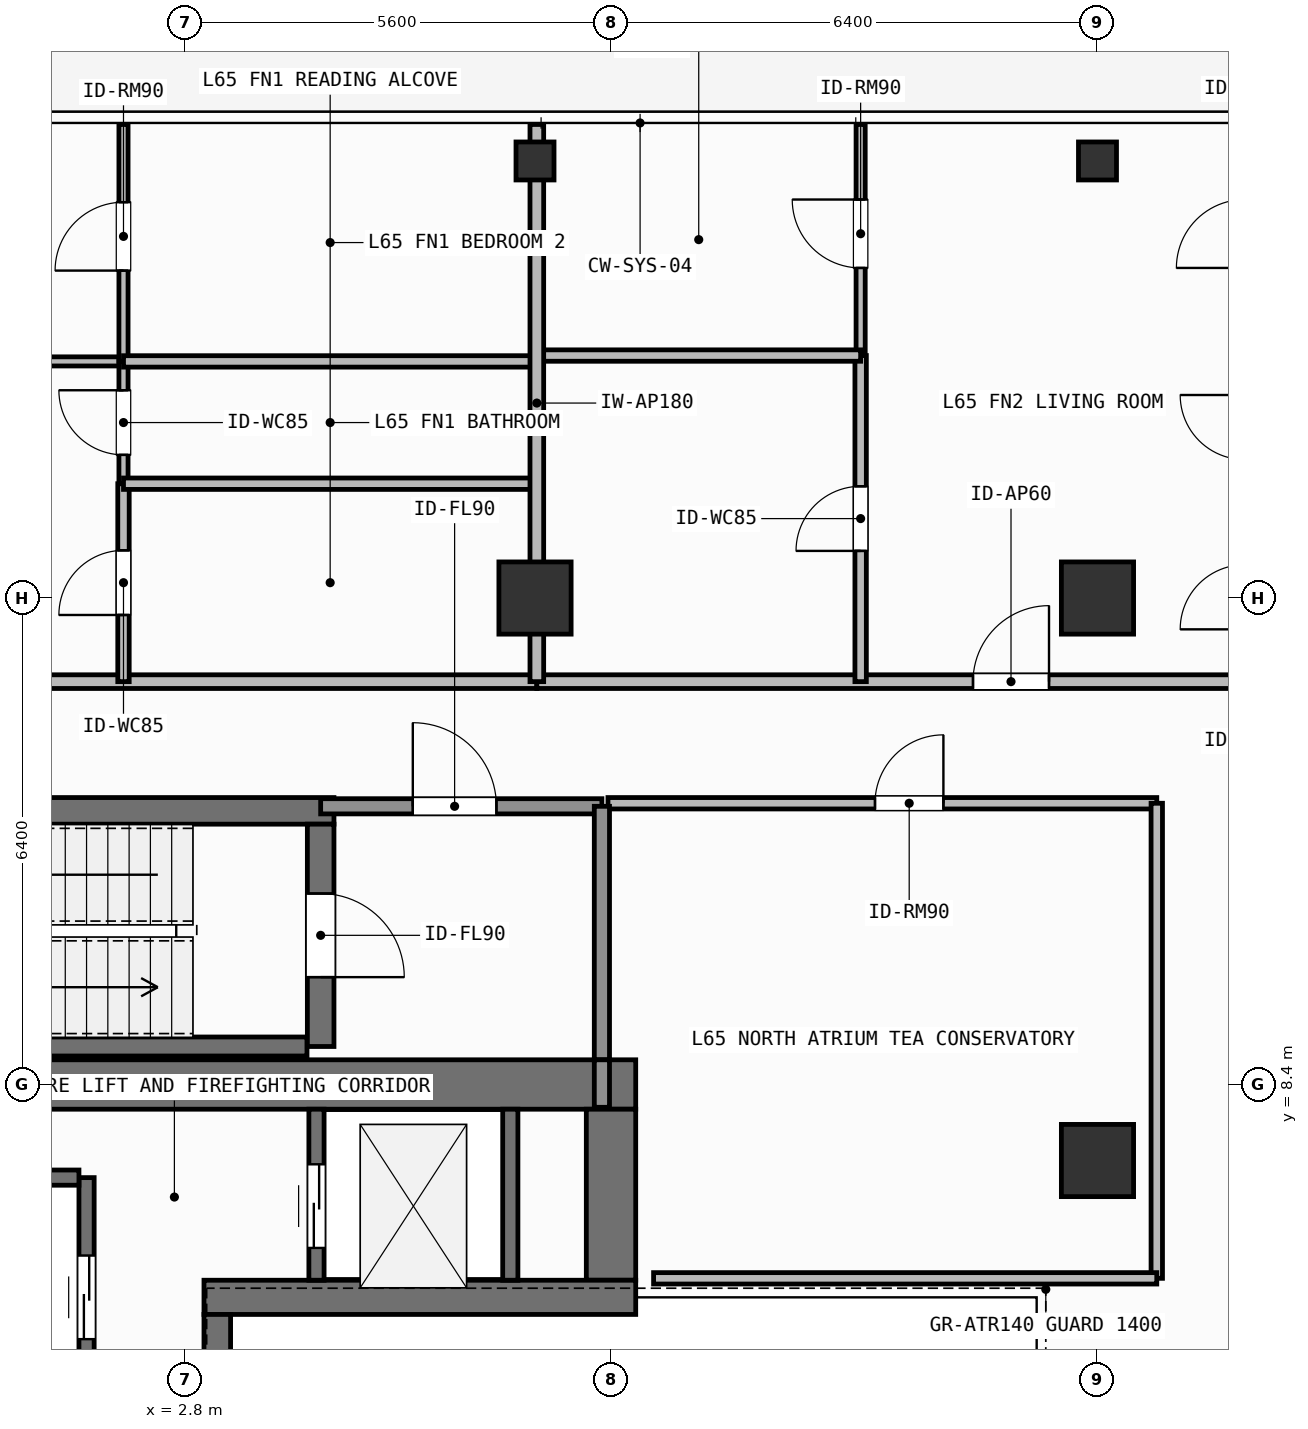
"""IFC4 building model, lengths in metres.
Left out: names, types, materials, properties, quantities, classifications, styles, units other than length and angle.
Written with IfcOpenShell. Run it as: python <this file> out.ifc"""

import sys

from ifc_helpers import new_model, si_unit, direction, frame, frame_2d, origin, origin_2d, place, context, subcontext, project, spatial, rectangle, hollow_rectangle, extrude, element, fill, save


model = new_model("IFC4")
c1 = context("Model", 3, precision=1e-05, world=origin(), true_north=direction((0.0, 1.0)))
c2 = subcontext(c1, "Body", "Model", "MODEL_VIEW")
j1 = project(units=[si_unit("LENGTHUNIT", "METRE"), si_unit("PLANEANGLEUNIT", "RADIAN")], contexts=[c1])
p1 = place(None, origin())
s1 = spatial("IfcSite", under=j1, at=p1, CompositionType="ELEMENT")
p2 = place(p1, origin())
s2 = spatial("IfcBuilding", under=s1, at=p2, CompositionType="ELEMENT")
p3 = place(p2, frame((0.0, 0.0, 266.4)))
s3 = spatial("IfcBuildingStorey", under=s2, at=p3, CompositionType="ELEMENT", Elevation=266.4)
p4 = place(p3, frame((-7.55, 8.4, 0.0), z_axis=(0.0, 0.0, 1.0), x_axis=(1.0, 0.0, 0.0)))
e1 = element("IfcWall", 1, at=p4, inside=s3, PredefinedType="SHEAR", context=c2, shape_type="SweptSolid", body=[
    extrude(rectangle(XDim=16.275, YDim=0.65, at=frame_2d((8.138, 0.0))), origin(), (0.0, 0.0, 1.0), 3.9),
])
p5 = place(p3, frame((8.4, 5.825, 0.0), z_axis=(0.0, 0.0, 1.0), x_axis=(0.0, 1.0, 0.0)))
e2 = element("IfcWall", 2, at=p5, inside=s3, PredefinedType="SHEAR", context=c2, shape_type="SweptSolid", body=[
    extrude(rectangle(XDim=2.25, YDim=0.65, at=frame_2d((1.125, 0.0))), origin(), (0.0, 0.0, 1.0), 3.9),
])
p6 = place(p3, frame((3.045, 5.6, 0.0), z_axis=(0.0, 0.0, 1.0), x_axis=(1.0, 0.0, 0.0)))
e3 = element("IfcWall", 3, at=p6, inside=s3, PredefinedType="SHEAR", context=c2, shape_type="SweptSolid", body=[
    extrude(rectangle(XDim=5.68, YDim=0.45, at=frame_2d((2.84, 0.0))), origin(), (0.0, 0.0, 1.0), 3.9),
])
p7 = place(p3, frame((3.22, -5.375, 0.0), z_axis=(0.0, 0.0, 1.0), x_axis=(0.0, 1.0, 0.0)))
e4 = element("IfcWall", 4, at=p7, inside=s3, PredefinedType="SHEAR", context=c2, shape_type="SweptSolid", body=[
    extrude(rectangle(XDim=10.75, YDim=0.35, at=frame_2d((5.375, 0.0))), origin(), (0.0, 0.0, 1.0), 3.9),
])
p8 = place(p3, frame((-2.555, 12.0, 0.0), z_axis=(0.0, 0.0, 1.0), x_axis=(1.0, 0.0, 0.0)))
e5 = element("IfcWall", 5, at=p8, inside=s3, PredefinedType="SHEAR", context=c2, shape_type="SweptSolid", body=[
    extrude(rectangle(XDim=7.31, YDim=0.35, at=frame_2d((3.655, 0.0))), origin(), (0.0, 0.0, 1.0), 3.9),
])
p9 = place(p3, frame((-2.2, 8.9, 0.0), z_axis=(0.0, 0.0, 1.0), x_axis=(1.0, 0.0, 0.0)))
e6 = element("IfcWall", 6, at=p9, inside=s3, PredefinedType="SHEAR", context=c2, shape_type="SweptSolid", body=[
    extrude(rectangle(XDim=6.6, YDim=0.25, at=frame_2d((3.3, 0.0))), origin(), (0.0, 0.0, 1.0), 3.9),
])
p10 = place(p3, frame((4.58, 11.825, 0.0), z_axis=(0.0, 0.0, 1.0), x_axis=(0.0, -1.0, 0.0)))
e7 = element("IfcWall", 7, at=p10, inside=s3, PredefinedType="SHEAR", context=c2, shape_type="SweptSolid", body=[
    extrude(rectangle(XDim=2.925, YDim=0.35, at=frame_2d((1.462, 0.0))), origin(), (0.0, 0.0, 1.0), 3.9),
])
p11 = place(p10, frame((0.913, 0.0, 0.0)))
e8 = element("IfcOpeningElement", 8, at=p11, cuts=e7, PredefinedType="OPENING", context=c2, shape_type="SweptSolid", body=[
    extrude(rectangle(XDim=1.1, YDim=2.15, at=frame_2d((0.55, 1.075))), frame((0.0, 0.185, 0.0), z_axis=(0.0, -1.0, 0.0), x_axis=(1.0, 0.0, 0.0)), (0.0, 0.0, 1.0), 0.37),
])
for number, where, z_axis, x_axis in (
    (9, (7.4, 14.8, 0.0), (0.0, 0.0, 1.0), (1.0, 0.0, 0.0)),
    (10, (14.8, 14.8, 0.0), (0.0, 0.0, 1.0), (1.0, 0.0, 0.0)),
    (11, (14.8, 7.4, 0.0), (0.0, 0.0, 1.0), (1.0, 0.0, 0.0)),
):
    element("IfcColumn", number, at=place(p3, frame(where, z_axis=z_axis, x_axis=x_axis)), inside=s3, PredefinedType="COLUMN", context=c2, shape_type="SweptSolid", body=[
        extrude(rectangle(XDim=0.95, YDim=0.95, at=origin_2d()), origin(), (0.0, 0.0, 1.0), 3.9),
    ])
for number, where, z_axis, x_axis in (
    (12, (7.4, 20.55, 0.0), (0.0, 0.0, 1.0), (1.0, 0.0, 0.0)),
    (13, (14.8, 20.55, 0.0), (0.0, 0.0, 1.0), (1.0, 0.0, 0.0)),
):
    element("IfcColumn", number, at=place(p3, frame(where, z_axis=z_axis, x_axis=x_axis)), inside=s3, PredefinedType="COLUMN", context=c2, shape_type="SweptSolid", body=[
        extrude(hollow_rectangle(XDim=0.5, YDim=0.5, WallThickness=0.025, at=origin_2d()), origin(), (0.0, 0.0, 1.0), 3.9),
    ])
p12 = place(p3, frame((1.5, 4.025, 0.0), z_axis=(0.0, 0.0, 1.0), x_axis=(0.0, 1.0, 0.0)))
e14 = element("IfcWall", 14, at=p12, inside=s3, PredefinedType="SHEAR", context=c2, shape_type="SweptSolid", body=[
    extrude(rectangle(XDim=3.15, YDim=0.2, at=frame_2d((1.575, 0.0))), origin(), (0.0, 0.0, 1.0), 3.68),
])
p13 = place(p12, frame((1.025, 0.0, 0.0)))
e15 = element("IfcOpeningElement", 15, at=p13, cuts=e14, PredefinedType="OPENING", context=c2, shape_type="SweptSolid", body=[
    extrude(rectangle(XDim=1.1, YDim=2.2, at=frame_2d((0.55, 1.1))), frame((0.0, 0.11, 0.0), z_axis=(0.0, -1.0, 0.0), x_axis=(1.0, 0.0, 0.0)), (0.0, 0.0, 1.0), 0.22),
])
p14 = place(p3, frame((-1.0, 7.175, 0.0), z_axis=(0.0, 0.0, 1.0), x_axis=(1.0, 0.0, 0.0)))
e16 = element("IfcWall", 16, at=p14, inside=s3, PredefinedType="SHEAR", context=c2, shape_type="SweptSolid", body=[
    extrude(rectangle(XDim=2.4, YDim=0.2, at=frame_2d((1.2, 0.0))), origin(), (0.0, 0.0, 1.0), 3.68),
])
p15 = place(p3, frame((4.525, 5.825, 0.0), z_axis=(0.0, 0.0, 1.0), x_axis=(0.0, 1.0, 0.0)))
e17 = element("IfcWall", 17, at=p15, inside=s3, PredefinedType="SHEAR", context=c2, shape_type="SweptSolid", body=[
    extrude(rectangle(XDim=2.25, YDim=0.2, at=frame_2d((1.125, 0.0))), origin(), (0.0, 0.0, 1.0), 3.68),
])
p16 = place(p15, frame((0.425, 0.0, 0.0)))
e18 = element("IfcOpeningElement", 18, at=p16, cuts=e17, PredefinedType="OPENING", context=c2, shape_type="SweptSolid", body=[
    extrude(rectangle(XDim=1.1, YDim=2.2, at=frame_2d((0.55, 1.1))), frame((0.0, 0.11, 0.0), z_axis=(0.0, -1.0, 0.0), x_axis=(1.0, 0.0, 0.0)), (0.0, 0.0, 1.0), 0.22),
])
p17 = place(p3, frame((7.075, 5.825, 0.0), z_axis=(0.0, 0.0, 1.0), x_axis=(0.0, 1.0, 0.0)))
e19 = element("IfcWall", 19, at=p17, inside=s3, PredefinedType="SHEAR", context=c2, shape_type="SweptSolid", body=[
    extrude(rectangle(XDim=2.25, YDim=0.2, at=frame_2d((1.125, 0.0))), origin(), (0.0, 0.0, 1.0), 3.68),
])
p18 = place(p3, frame((4.58, 12.06, 0.0), z_axis=(0.0, 0.0, 1.0), x_axis=(1.0, 0.0, 0.0)))
e20 = element("IfcWall", 20, at=p18, inside=s3, PredefinedType="SOLIDWALL", context=c2, shape_type="SweptSolid", body=[
    extrude(rectangle(XDim=3.7, YDim=0.2, at=frame_2d((1.85, 0.0))), origin(), (0.0, 0.0, 1.0), 3.68),
])
p19 = place(p18, frame((1.212, 0.0, 0.0)))
e21 = element("IfcOpeningElement", 21, at=p19, cuts=e20, PredefinedType="OPENING", context=c2, shape_type="SweptSolid", body=[
    extrude(rectangle(XDim=1.1, YDim=2.15, at=frame_2d((0.55, 1.075))), frame((0.0, 0.11, 0.0), z_axis=(0.0, -1.0, 0.0), x_axis=(1.0, 0.0, 0.0)), (0.0, 0.0, 1.0), 0.22),
])
p20 = place(p3, frame((8.36, 12.1, 0.0), z_axis=(0.0, 0.0, 1.0), x_axis=(1.0, 0.0, 0.0)))
e22 = element("IfcWall", 22, at=p20, inside=s3, PredefinedType="PARTITIONING", context=c2, shape_type="SweptSolid", body=[
    extrude(rectangle(XDim=7.22, YDim=0.15, at=frame_2d((3.61, 0.0))), origin(), (0.0, 0.0, 1.0), 3.68),
])
p21 = place(p20, frame((3.513, 0.0, 0.0)))
e23 = element("IfcOpeningElement", 23, at=p21, cuts=e22, PredefinedType="OPENING", context=c2, shape_type="SweptSolid", body=[
    extrude(rectangle(XDim=0.9, YDim=2.1, at=frame_2d((0.45, 1.05))), frame((0.0, 0.085, 0.0), z_axis=(0.0, -1.0, 0.0), x_axis=(1.0, 0.0, 0.0)), (0.0, 0.0, 1.0), 0.17),
])
p22 = place(p3, frame((-13.72, 13.7, 0.0), z_axis=(0.0, 0.0, 1.0), x_axis=(1.0, 0.0, 0.0)))
e24 = element("IfcWall", 24, at=p22, inside=s3, PredefinedType="PARTITIONING", context=c2, shape_type="SweptSolid", body=[
    extrude(rectangle(XDim=21.144, YDim=0.18, at=frame_2d((10.572, 0.0))), origin(), (0.0, 0.0, 1.0), 3.68),
])
p23 = place(p22, frame((9.625, 0.0, 0.0)))
e25 = element("IfcOpeningElement", 25, at=p23, cuts=e24, PredefinedType="OPENING", context=c2, shape_type="SweptSolid", body=[
    extrude(rectangle(XDim=1.0, YDim=2.2, at=frame_2d((0.5, 1.1))), frame((0.0, 0.1, 0.0), z_axis=(0.0, -1.0, 0.0), x_axis=(1.0, 0.0, 0.0)), (0.0, 0.0, 1.0), 0.2),
])
p24 = place(p3, frame((-9.395, 17.913, 0.0), z_axis=(0.0, 0.0, 1.0), x_axis=(1.0, 0.0, 0.0)))
e26 = element("IfcWall", 26, at=p24, inside=s3, PredefinedType="PARTITIONING", context=c2, shape_type="SweptSolid", body=[
    extrude(rectangle(XDim=11.381, YDim=0.12, at=frame_2d((5.69, 0.0))), origin(), (0.0, 0.0, 1.0), 3.68),
])
p25 = place(p24, frame((5.151, 0.0, 0.0)))
e27 = element("IfcOpeningElement", 27, at=p25, cuts=e26, PredefinedType="OPENING", context=c2, shape_type="SweptSolid", body=[
    extrude(rectangle(XDim=0.9, YDim=2.1, at=frame_2d((0.45, 1.05))), frame((0.0, 0.07, 0.0), z_axis=(0.0, -1.0, 0.0), x_axis=(1.0, 0.0, 0.0)), (0.0, 0.0, 1.0), 0.14),
])
p26 = place(p3, frame((1.986, 13.7, 0.0), z_axis=(0.0, 0.0, 1.0), x_axis=(0.0, 1.0, 0.0)))
e28 = element("IfcWall", 28, at=p26, inside=s3, PredefinedType="PARTITIONING", context=c2, shape_type="SweptSolid", body=[
    extrude(rectangle(XDim=2.604, YDim=0.15, at=frame_2d((1.302, 0.0))), origin(), (0.0, 0.0, 1.0), 3.68),
])
p27 = place(p26, frame((0.877, 0.0, 0.0)))
e29 = element("IfcOpeningElement", 29, at=p27, cuts=e28, PredefinedType="OPENING", context=c2, shape_type="SweptSolid", body=[
    extrude(rectangle(XDim=0.85, YDim=2.1, at=frame_2d((0.425, 1.05))), frame((0.0, 0.085, 0.0), z_axis=(0.0, -1.0, 0.0), x_axis=(1.0, 0.0, 0.0)), (0.0, 0.0, 1.0), 0.17),
])
p28 = place(p3, frame((1.986, 16.304, 0.0), z_axis=(0.0, 0.0, 1.0), x_axis=(0.0, 1.0, 0.0)))
e30 = element("IfcWall", 30, at=p28, inside=s3, PredefinedType="PARTITIONING", context=c2, shape_type="SweptSolid", body=[
    extrude(rectangle(XDim=1.609, YDim=0.12, at=frame_2d((0.805, 0.0))), origin(), (0.0, 0.0, 1.0), 3.68),
])
p29 = place(p28, frame((0.379, 0.0, 0.0)))
e31 = element("IfcOpeningElement", 31, at=p29, cuts=e30, PredefinedType="OPENING", context=c2, shape_type="SweptSolid", body=[
    extrude(rectangle(XDim=0.85, YDim=2.1, at=frame_2d((0.425, 1.05))), frame((0.0, 0.07, 0.0), z_axis=(0.0, -1.0, 0.0), x_axis=(1.0, 0.0, 0.0)), (0.0, 0.0, 1.0), 0.14),
])
p30 = place(p3, frame((1.986, 17.913, 0.0), z_axis=(0.0, 0.0, 1.0), x_axis=(0.0, 1.0, 0.0)))
e32 = element("IfcWall", 32, at=p30, inside=s3, PredefinedType="PARTITIONING", context=c2, shape_type="SweptSolid", body=[
    extrude(rectangle(XDim=3.117, YDim=0.12, at=frame_2d((1.559, 0.0))), origin(), (0.0, 0.0, 1.0), 3.68),
])
p31 = place(p30, frame((1.195, 0.0, 0.0)))
e33 = element("IfcOpeningElement", 33, at=p31, cuts=e32, PredefinedType="OPENING", context=c2, shape_type="SweptSolid", body=[
    extrude(rectangle(XDim=0.9, YDim=2.1, at=frame_2d((0.45, 1.05))), frame((0.0, 0.07, 0.0), z_axis=(0.0, -1.0, 0.0), x_axis=(1.0, 0.0, 0.0)), (0.0, 0.0, 1.0), 0.14),
])
p32 = place(p3, frame((7.424, 13.7, 0.0), z_axis=(0.0, 0.0, 1.0), x_axis=(1.0, 0.0, 0.0)))
e34 = element("IfcWall", 34, at=p32, inside=s3, PredefinedType="PARTITIONING", context=c2, shape_type="SweptSolid", body=[
    extrude(rectangle(XDim=14.096, YDim=0.18, at=frame_2d((7.048, 0.0))), origin(), (0.0, 0.0, 1.0), 3.68),
])
p33 = place(p32, frame((5.738, 0.0, 0.0)))
e35 = element("IfcOpeningElement", 35, at=p33, cuts=e34, PredefinedType="OPENING", context=c2, shape_type="SweptSolid", body=[
    extrude(rectangle(XDim=1.0, YDim=2.2, at=frame_2d((0.5, 1.1))), frame((0.0, 0.1, 0.0), z_axis=(0.0, -1.0, 0.0), x_axis=(1.0, 0.0, 0.0)), (0.0, 0.0, 1.0), 0.2),
])
p34 = place(p3, frame((11.684, 13.7, 0.0), z_axis=(0.0, 0.0, 1.0), x_axis=(0.0, 1.0, 0.0)))
e36 = element("IfcWall", 36, at=p34, inside=s3, PredefinedType="PARTITIONING", context=c2, shape_type="SweptSolid", body=[
    extrude(rectangle(XDim=4.29, YDim=0.15, at=frame_2d((2.145, 0.0))), origin(), (0.0, 0.0, 1.0), 3.68),
])
p35 = place(p34, frame((1.72, 0.0, 0.0)))
e37 = element("IfcOpeningElement", 37, at=p35, cuts=e36, PredefinedType="OPENING", context=c2, shape_type="SweptSolid", body=[
    extrude(rectangle(XDim=0.85, YDim=2.1, at=frame_2d((0.425, 1.05))), frame((0.0, 0.085, 0.0), z_axis=(0.0, -1.0, 0.0), x_axis=(1.0, 0.0, 0.0)), (0.0, 0.0, 1.0), 0.17),
])
p36 = place(p3, frame((11.684, 17.99, 0.0), z_axis=(0.0, 0.0, 1.0), x_axis=(0.0, 1.0, 0.0)))
e38 = element("IfcWall", 38, at=p36, inside=s3, PredefinedType="PARTITIONING", context=c2, shape_type="SweptSolid", body=[
    extrude(rectangle(XDim=3.04, YDim=0.12, at=frame_2d((1.52, 0.0))), origin(), (0.0, 0.0, 1.0), 3.68),
])
p37 = place(p36, frame((1.153, 0.0, 0.0)))
e39 = element("IfcOpeningElement", 39, at=p37, cuts=e38, PredefinedType="OPENING", context=c2, shape_type="SweptSolid", body=[
    extrude(rectangle(XDim=0.9, YDim=2.1, at=frame_2d((0.45, 1.05))), frame((0.0, 0.07, 0.0), z_axis=(0.0, -1.0, 0.0), x_axis=(1.0, 0.0, 0.0)), (0.0, 0.0, 1.0), 0.14),
])
p38 = place(p3, frame((8.28, 8.725, 0.0), z_axis=(0.0, 0.0, 1.0), x_axis=(0.0, 1.0, 0.0)))
e40 = element("IfcWall", 40, at=p38, inside=s3, PredefinedType="SOLIDWALL", context=c2, shape_type="SweptSolid", body=[
    extrude(rectangle(XDim=3.335, YDim=0.2, at=frame_2d((1.667, 0.0))), origin(), (0.0, 0.0, 1.0), 3.68),
])
p39 = place(p3, frame((8.28, 8.1, 0.0), z_axis=(0.0, 0.0, 1.0), x_axis=(0.0, 1.0, 0.0)))
e41 = element("IfcWall", 41, at=p39, inside=s3, PredefinedType="SOLIDWALL", context=c2, shape_type="SweptSolid", body=[
    extrude(rectangle(XDim=0.625, YDim=0.2, at=frame_2d((0.312, 0.0))), origin(), (0.0, 0.0, 1.0), 3.68),
])
p40 = place(p3, frame((15.58, 5.85, 0.0), z_axis=(0.0, 0.0, 1.0), x_axis=(0.0, 1.0, 0.0)))
e42 = element("IfcWall", 42, at=p40, inside=s3, PredefinedType="PARTITIONING", context=c2, shape_type="SweptSolid", body=[
    extrude(rectangle(XDim=6.25, YDim=0.15, at=frame_2d((3.125, 0.0))), origin(), (0.0, 0.0, 1.0), 3.68),
])
p41 = place(p3, frame((8.96, 5.85, 0.0), z_axis=(0.0, 0.0, 1.0), x_axis=(1.0, 0.0, 0.0)))
e43 = element("IfcWall", 43, at=p41, inside=s3, PredefinedType="PARTITIONING", context=c2, shape_type="SweptSolid", body=[
    extrude(rectangle(XDim=6.62, YDim=0.15, at=frame_2d((3.31, 0.0))), origin(), (0.0, 0.0, 1.0), 3.68),
])
for number, where, z_axis, x_axis in (
    (44, (1.986, 16.304, 0.0), (0.0, 0.0, 1.0), (1.0, 0.0, 0.0)),
    (45, (1.986, 17.913, 0.0), (0.0, 0.0, 1.0), (1.0, 0.0, 0.0)),
):
    element("IfcWall", number, at=place(p3, frame(where, z_axis=z_axis, x_axis=x_axis)), inside=s3, PredefinedType="PARTITIONING", context=c2, shape_type="SweptSolid", body=[
        extrude(rectangle(XDim=5.438, YDim=0.15, at=frame_2d((2.719, 0.0))), origin(), (0.0, 0.0, 1.0), 3.68),
    ])
p42 = place(p3, frame((7.424, 17.99, 0.0), z_axis=(0.0, 0.0, 1.0), x_axis=(1.0, 0.0, 0.0)))
e46 = element("IfcWall", 46, at=p42, inside=s3, PredefinedType="PARTITIONING", context=c2, shape_type="SweptSolid", body=[
    extrude(rectangle(XDim=4.26, YDim=0.15, at=frame_2d((2.13, 0.0))), origin(), (0.0, 0.0, 1.0), 3.68),
])
p43 = place(p3, frame((7.424, 13.7, 0.0), z_axis=(0.0, 0.0, 1.0), x_axis=(0.0, 1.0, 0.0)))
e47 = element("IfcWall", 47, at=p43, inside=s3, PredefinedType="PARTITIONING", context=c2, shape_type="SweptSolid", body=[
    extrude(rectangle(XDim=7.33, YDim=0.18, at=frame_2d((3.665, 0.0))), origin(), (0.0, 0.0, 1.0), 3.182),
])
p44 = place(p13, origin())
e48 = element("IfcDoor", 48, at=p44, inside=s3, OperationType="SLIDING_TO_LEFT", PredefinedType="DOOR", context=c2, shape_type="SweptSolid", body=[
    extrude(rectangle(XDim=1.1, YDim=2.2, at=frame_2d((0.55, 1.1))), frame((0.0, 0.025, 0.0), z_axis=(0.0, -1.0, 0.0), x_axis=(1.0, 0.0, 0.0)), (0.0, 0.0, 1.0), 0.05),
])
fill(e15, e48)
p45 = place(p16, origin())
e49 = element("IfcDoor", 49, at=p45, inside=s3, OperationType="SLIDING_TO_LEFT", PredefinedType="DOOR", context=c2, shape_type="SweptSolid", body=[
    extrude(rectangle(XDim=1.1, YDim=2.2, at=frame_2d((0.55, 1.1))), frame((0.0, 0.025, 0.0), z_axis=(0.0, -1.0, 0.0), x_axis=(1.0, 0.0, 0.0)), (0.0, 0.0, 1.0), 0.05),
])
fill(e18, e49)
p46 = place(p11, origin())
e50 = element("IfcDoor", 50, at=p46, inside=s3, OperationType="SINGLE_SWING_RIGHT", PredefinedType="DOOR", context=c2, shape_type="SweptSolid", body=[
    extrude(rectangle(XDim=1.1, YDim=2.15, at=frame_2d((0.55, 1.075))), frame((0.0, 0.025, 0.0), z_axis=(0.0, -1.0, 0.0), x_axis=(1.0, 0.0, 0.0)), (0.0, 0.0, 1.0), 0.05),
])
fill(e8, e50)
p47 = place(p19, origin())
e51 = element("IfcDoor", 51, at=p47, inside=s3, OperationType="SINGLE_SWING_LEFT", PredefinedType="DOOR", context=c2, shape_type="SweptSolid", body=[
    extrude(rectangle(XDim=1.1, YDim=2.15, at=frame_2d((0.55, 1.075))), frame((0.0, 0.025, 0.0), z_axis=(0.0, -1.0, 0.0), x_axis=(1.0, 0.0, 0.0)), (0.0, 0.0, 1.0), 0.05),
])
fill(e21, e51)
p48 = place(p21, origin())
e52 = element("IfcDoor", 52, at=p48, inside=s3, OperationType="SINGLE_SWING_RIGHT", PredefinedType="DOOR", context=c2, shape_type="SweptSolid", body=[
    extrude(rectangle(XDim=0.9, YDim=2.1, at=frame_2d((0.45, 1.05))), frame((0.0, 0.025, 0.0), z_axis=(0.0, -1.0, 0.0), x_axis=(1.0, 0.0, 0.0)), (0.0, 0.0, 1.0), 0.05),
])
fill(e23, e52)
p49 = place(p27, origin())
e53 = element("IfcDoor", 53, at=p49, inside=s3, OperationType="SINGLE_SWING_LEFT", PredefinedType="DOOR", context=c2, shape_type="SweptSolid", body=[
    extrude(rectangle(XDim=0.85, YDim=2.1, at=frame_2d((0.425, 1.05))), frame((0.0, 0.025, 0.0), z_axis=(0.0, -1.0, 0.0), x_axis=(1.0, 0.0, 0.0)), (0.0, 0.0, 1.0), 0.05),
])
fill(e29, e53)
p50 = place(p29, origin())
e54 = element("IfcDoor", 54, at=p50, inside=s3, OperationType="SINGLE_SWING_RIGHT", PredefinedType="DOOR", context=c2, shape_type="SweptSolid", body=[
    extrude(rectangle(XDim=0.85, YDim=2.1, at=frame_2d((0.425, 1.05))), frame((0.0, 0.025, 0.0), z_axis=(0.0, -1.0, 0.0), x_axis=(1.0, 0.0, 0.0)), (0.0, 0.0, 1.0), 0.05),
])
fill(e31, e54)
p51 = place(p31, origin())
e55 = element("IfcDoor", 55, at=p51, inside=s3, OperationType="SINGLE_SWING_LEFT", PredefinedType="DOOR", context=c2, shape_type="SweptSolid", body=[
    extrude(rectangle(XDim=0.9, YDim=2.1, at=frame_2d((0.45, 1.05))), frame((0.0, 0.025, 0.0), z_axis=(0.0, -1.0, 0.0), x_axis=(1.0, 0.0, 0.0)), (0.0, 0.0, 1.0), 0.05),
])
fill(e33, e55)
p52 = place(p33, origin())
e56 = element("IfcDoor", 56, at=p52, inside=s3, OperationType="SINGLE_SWING_RIGHT", PredefinedType="DOOR", context=c2, shape_type="SweptSolid", body=[
    extrude(rectangle(XDim=1.0, YDim=2.2, at=frame_2d((0.5, 1.1))), frame((0.0, 0.025, 0.0), z_axis=(0.0, -1.0, 0.0), x_axis=(1.0, 0.0, 0.0)), (0.0, 0.0, 1.0), 0.05),
])
fill(e35, e56)
p53 = place(p35, origin())
e57 = element("IfcDoor", 57, at=p53, inside=s3, OperationType="SINGLE_SWING_LEFT", PredefinedType="DOOR", context=c2, shape_type="SweptSolid", body=[
    extrude(rectangle(XDim=0.85, YDim=2.1, at=frame_2d((0.425, 1.05))), frame((0.0, 0.025, 0.0), z_axis=(0.0, -1.0, 0.0), x_axis=(1.0, 0.0, 0.0)), (0.0, 0.0, 1.0), 0.05),
])
fill(e37, e57)
p54 = place(p37, origin())
e58 = element("IfcDoor", 58, at=p54, inside=s3, OperationType="SINGLE_SWING_RIGHT", PredefinedType="DOOR", context=c2, shape_type="SweptSolid", body=[
    extrude(rectangle(XDim=0.9, YDim=2.1, at=frame_2d((0.45, 1.05))), frame((0.0, 0.025, 0.0), z_axis=(0.0, -1.0, 0.0), x_axis=(1.0, 0.0, 0.0)), (0.0, 0.0, 1.0), 0.05),
])
fill(e39, e58)
save(model, sys.argv[1])
